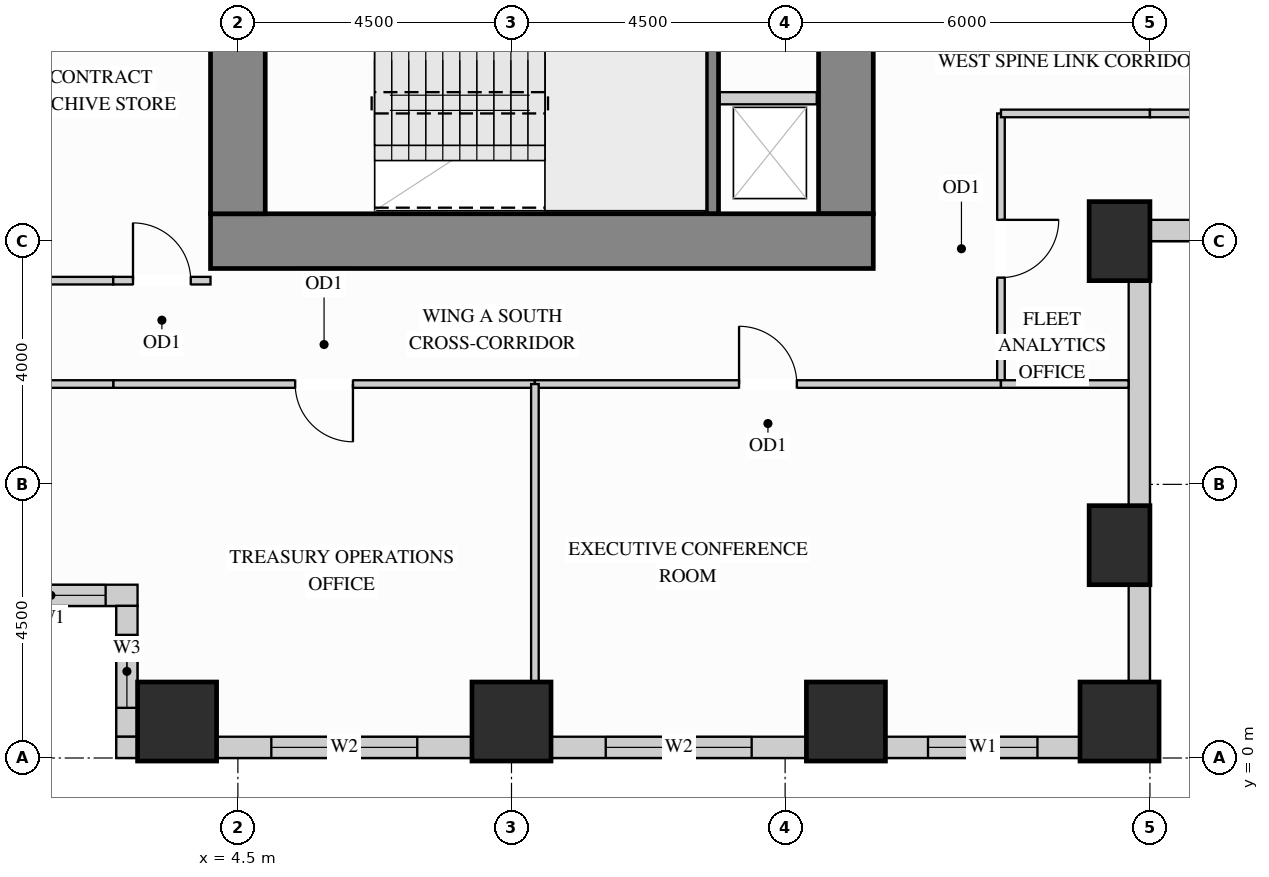
"""IFC4 building model, lengths in metres.
Left out: names, types, materials, properties, quantities, classifications, styles, units other than length and angle.
Written with IfcOpenShell. Run it as: python <this file> out.ifc"""

import sys

from ifc_helpers import new_model, si_unit, direction, frame, frame_2d, origin, origin_2d, place, context, subcontext, project, spatial, rectangle, extrude, source, transform, mapped, element, fill, save


model = new_model("IFC4")
c1 = context("Model", 3, precision=1e-05, world=origin(), true_north=direction((0.0, 1.0)))
c2 = subcontext(c1, "Body", "Model", "MODEL_VIEW")
j1 = project(units=[si_unit("LENGTHUNIT", "METRE"), si_unit("PLANEANGLEUNIT", "RADIAN")], contexts=[c1])
p1 = place(None, origin())
s1 = spatial("IfcSite", under=j1, at=p1, CompositionType="ELEMENT")
p2 = place(p1, origin())
s2 = spatial("IfcBuilding", under=s1, at=p2, CompositionType="ELEMENT")
p3 = place(p2, frame((0.0, 0.0, 40.5)))
s3 = spatial("IfcBuildingStorey", under=s2, at=p3, CompositionType="ELEMENT", Elevation=40.5)
m1 = source(origin(), c2, "Body", "SweptSolid", [
    extrude(rectangle(XDim=1.0, YDim=1.3, at=origin_2d()), origin(), (0.0, 0.0, 1.0), 3.38),
])
for number, where, z_axis, x_axis in (
    (1, (19.0, 3.5, 0.0), (0.0, 0.0, 1.0), (1.0, 0.0, 0.0)),
    (2, (19.0, 8.5, 0.0), (0.0, 0.0, 1.0), (1.0, 0.0, 0.0)),
):
    element("IfcColumn", number, at=place(p3, frame(where, z_axis=z_axis, x_axis=x_axis)), inside=s3, PredefinedType="COLUMN", context=c2, shape_type="MappedRepresentation", body=[
        mapped(m1, transform((0.0, 0.0, 0.0), x_axis=(1.0, 0.0, 0.0), y_axis=(0.0, 1.0, 0.0), z_axis=(0.0, 0.0, 1.0))),
    ])
m2 = source(origin(), c2, "Body", "SweptSolid", [
    extrude(rectangle(XDim=1.3, YDim=1.3, at=origin_2d()), origin(), (0.0, 0.0, 1.0), 3.38),
])
for number, where, z_axis, x_axis in (
    (3, (14.5, 0.6, 0.0), (0.0, 0.0, 1.0), (1.0, 0.0, 0.0)),
    (4, (19.0, 0.6, 0.0), (0.0, 0.0, 1.0), (1.0, 0.0, 0.0)),
    (5, (3.5, 0.6, 0.0), (0.0, 0.0, 1.0), (1.0, 0.0, 0.0)),
    (6, (9.0, 0.6, 0.0), (0.0, 0.0, 1.0), (1.0, 0.0, 0.0)),
):
    element("IfcColumn", number, at=place(p3, frame(where, z_axis=z_axis, x_axis=x_axis)), inside=s3, PredefinedType="COLUMN", context=c2, shape_type="MappedRepresentation", body=[
        mapped(m2, transform((0.0, 0.0, 0.0), x_axis=(1.0, 0.0, 0.0), y_axis=(0.0, 1.0, 0.0), z_axis=(0.0, 0.0, 1.0))),
    ])
m3 = source(origin(), c2, "Body", "SweptSolid", [
    extrude(rectangle(XDim=9.87, YDim=0.9, at=frame_2d((4.935, 0.0))), origin(), (0.0, 0.0, 1.0), 3.38),
])
p4 = place(p3, frame((14.5, 8.95, 0.0), z_axis=(0.0, 0.0, 1.0), x_axis=(0.0, 1.0, 0.0)))
e7 = element("IfcWall", 7, at=p4, inside=s3, PredefinedType="SHEAR", context=c2, shape_type="MappedRepresentation", body=[
    mapped(m3, transform((0.0, 0.0, 0.0), x_axis=(1.0, 0.0, 0.0), y_axis=(0.0, 1.0, 0.0), z_axis=(0.0, 0.0, 1.0))),
])
m4 = source(origin(), c2, "Body", "SweptSolid", [
    extrude(rectangle(XDim=10.9, YDim=0.9, at=frame_2d((5.45, 0.0))), origin(), (0.0, 0.0, 1.0), 3.38),
])
p5 = place(p3, frame((4.05, 8.5, 0.0), z_axis=(0.0, 0.0, 1.0), x_axis=(1.0, 0.0, 0.0)))
e8 = element("IfcWall", 8, at=p5, inside=s3, PredefinedType="SHEAR", context=c2, shape_type="MappedRepresentation", body=[
    mapped(m4, transform((0.0, 0.0, 0.0), x_axis=(1.0, 0.0, 0.0), y_axis=(0.0, 1.0, 0.0), z_axis=(0.0, 0.0, 1.0))),
])
m5 = source(origin(), c2, "Body", "SweptSolid", [
    extrude(rectangle(XDim=20.1, YDim=0.9, at=frame_2d((10.05, 0.0))), origin(), (0.0, 0.0, 1.0), 3.38),
])
p6 = place(p3, frame((4.5, 8.95, 0.0), z_axis=(0.0, 0.0, 1.0), x_axis=(0.0, 1.0, 0.0)))
e9 = element("IfcWall", 9, at=p6, inside=s3, PredefinedType="SHEAR", context=c2, shape_type="MappedRepresentation", body=[
    mapped(m5, transform((0.0, 0.0, 0.0), x_axis=(1.0, 0.0, 0.0), y_axis=(0.0, 1.0, 0.0), z_axis=(0.0, 0.0, 1.0))),
])
p7 = place(p3, frame((0.0, 2.675, 0.0), z_axis=(0.0, 0.0, 1.0), x_axis=(1.0, 0.0, 0.0)))
e10 = element("IfcWall", 10, at=p7, inside=s3, PredefinedType="SOLIDWALL", context=c2, shape_type="SweptSolid", body=[
    extrude(rectangle(XDim=2.85, YDim=0.35, at=frame_2d((1.425, 0.0))), origin(), (0.0, 0.0, 1.0), 3.365),
])
p8 = place(p7, frame((0.525, 0.0, 0.78)))
e11 = element("IfcOpeningElement", 11, at=p8, cuts=e10, PredefinedType="OPENING", context=c2, shape_type="SweptSolid", body=[
    extrude(rectangle(XDim=1.8, YDim=2.1, at=frame_2d((0.9, 1.05))), frame((0.0, 0.185, 0.0), z_axis=(0.0, -1.0, 0.0), x_axis=(1.0, 0.0, 0.0)), (0.0, 0.0, 1.0), 0.37),
])
p9 = place(p3, frame((2.675, 2.502, 0.0), z_axis=(0.0, 0.0, 1.0), x_axis=(0.0, -1.0, 0.0)))
e12 = element("IfcWall", 12, at=p9, inside=s3, PredefinedType="SOLIDWALL", context=c2, shape_type="SweptSolid", body=[
    extrude(rectangle(XDim=2.154, YDim=0.35, at=frame_2d((1.077, 0.0))), origin(), (0.0, 0.0, 1.0), 3.365),
])
p10 = place(p9, frame((0.477, 0.0, 0.78)))
e13 = element("IfcOpeningElement", 13, at=p10, cuts=e12, PredefinedType="OPENING", context=c2, shape_type="SweptSolid", body=[
    extrude(rectangle(XDim=1.2, YDim=2.1, at=frame_2d((0.6, 1.05))), frame((0.0, 0.185, 0.0), z_axis=(0.0, -1.0, 0.0), x_axis=(1.0, 0.0, 0.0)), (0.0, 0.0, 1.0), 0.37),
])
m6 = source(origin(), c2, "Body", "SweptSolid", [
    extrude(rectangle(XDim=0.352, YDim=0.35, at=frame_2d((0.176, 0.0))), origin(), (0.0, 0.0, 1.0), 3.365),
])
p11 = place(p3, frame((2.5, 0.175, 0.0), z_axis=(0.0, 0.0, 1.0), x_axis=(1.0, 0.0, 0.0)))
e14 = element("IfcWall", 14, at=p11, inside=s3, PredefinedType="SOLIDWALL", context=c2, shape_type="MappedRepresentation", body=[
    mapped(m6, transform((0.0, 0.0, 0.0), x_axis=(1.0, 0.0, 0.0), y_axis=(0.0, 1.0, 0.0), z_axis=(0.0, 0.0, 1.0))),
])
p12 = place(p3, frame((4.148, 0.175, 0.0), z_axis=(0.0, 0.0, 1.0), x_axis=(1.0, 0.0, 0.0)))
e15 = element("IfcWall", 15, at=p12, inside=s3, PredefinedType="SOLIDWALL", context=c2, shape_type="SweptSolid", body=[
    extrude(rectangle(XDim=4.204, YDim=0.35, at=frame_2d((2.102, 0.0))), origin(), (0.0, 0.0, 1.0), 2.51),
])
p13 = place(p12, frame((0.902, 0.0, 0.78)))
e16 = element("IfcOpeningElement", 16, at=p13, cuts=e15, PredefinedType="OPENING", context=c2, shape_type="SweptSolid", body=[
    extrude(rectangle(XDim=2.4, YDim=1.55, at=frame_2d((1.2, 0.775))), frame((0.0, 0.185, 0.0), z_axis=(0.0, -1.0, 0.0), x_axis=(1.0, 0.0, 0.0)), (0.0, 0.0, 1.0), 0.37),
])
p14 = place(p3, frame((9.648, 0.175, 0.0), z_axis=(0.0, 0.0, 1.0), x_axis=(1.0, 0.0, 0.0)))
e17 = element("IfcWall", 17, at=p14, inside=s3, PredefinedType="SOLIDWALL", context=c2, shape_type="SweptSolid", body=[
    extrude(rectangle(XDim=4.204, YDim=0.35, at=frame_2d((2.102, 0.0))), origin(), (0.0, 0.0, 1.0), 2.51),
])
p15 = place(p14, frame((0.902, 0.0, 0.78)))
e18 = element("IfcOpeningElement", 18, at=p15, cuts=e17, PredefinedType="OPENING", context=c2, shape_type="SweptSolid", body=[
    extrude(rectangle(XDim=2.4, YDim=1.55, at=frame_2d((1.2, 0.775))), frame((0.0, 0.185, 0.0), z_axis=(0.0, -1.0, 0.0), x_axis=(1.0, 0.0, 0.0)), (0.0, 0.0, 1.0), 0.37),
])
p16 = place(p3, frame((15.148, 0.175, 0.0), z_axis=(0.0, 0.0, 1.0), x_axis=(1.0, 0.0, 0.0)))
e19 = element("IfcWall", 19, at=p16, inside=s3, PredefinedType="SOLIDWALL", context=c2, shape_type="SweptSolid", body=[
    extrude(rectangle(XDim=3.204, YDim=0.35, at=frame_2d((1.602, 0.0))), origin(), (0.0, 0.0, 1.0), 2.51),
])
p17 = place(p16, frame((0.702, 0.0, 0.78)))
e20 = element("IfcOpeningElement", 20, at=p17, cuts=e19, PredefinedType="OPENING", context=c2, shape_type="SweptSolid", body=[
    extrude(rectangle(XDim=1.8, YDim=1.55, at=frame_2d((0.9, 0.775))), frame((0.0, 0.185, 0.0), z_axis=(0.0, -1.0, 0.0), x_axis=(1.0, 0.0, 0.0)), (0.0, 0.0, 1.0), 0.37),
])
m7 = source(origin(), c2, "Body", "SweptSolid", [
    extrude(rectangle(XDim=1.604, YDim=0.35, at=frame_2d((0.802, 0.0))), origin(), (0.0, 0.0, 1.0), 2.51),
])
p18 = place(p3, frame((19.325, 1.248, 0.0), z_axis=(0.0, 0.0, 1.0), x_axis=(0.0, 1.0, 0.0)))
e21 = element("IfcWall", 21, at=p18, inside=s3, PredefinedType="SOLIDWALL", context=c2, shape_type="MappedRepresentation", body=[
    mapped(m7, transform((0.0, 0.0, 0.0), x_axis=(1.0, 0.0, 0.0), y_axis=(0.0, 1.0, 0.0), z_axis=(0.0, 0.0, 1.0))),
])
m8 = source(origin(), c2, "Body", "SweptSolid", [
    extrude(rectangle(XDim=3.704, YDim=0.35, at=frame_2d((1.852, 0.0))), origin(), (0.0, 0.0, 1.0), 2.51),
])
p19 = place(p3, frame((19.325, 4.148, 0.0), z_axis=(0.0, 0.0, 1.0), x_axis=(0.0, 1.0, 0.0)))
e22 = element("IfcWall", 22, at=p19, inside=s3, PredefinedType="SOLIDWALL", context=c2, shape_type="MappedRepresentation", body=[
    mapped(m8, transform((0.0, 0.0, 0.0), x_axis=(1.0, 0.0, 0.0), y_axis=(0.0, 1.0, 0.0), z_axis=(0.0, 0.0, 1.0))),
])
p20 = place(p3, frame((19.498, 8.675, 0.0), z_axis=(0.0, 0.0, 1.0), x_axis=(1.0, 0.0, 0.0)))
e23 = element("IfcWall", 23, at=p20, inside=s3, PredefinedType="SOLIDWALL", context=c2, shape_type="SweptSolid", body=[
    extrude(rectangle(XDim=3.404, YDim=0.35, at=frame_2d((1.702, 0.0))), origin(), (0.0, 0.0, 1.0), 3.365),
])
p21 = place(p20, frame((0.952, 0.0, 0.78)))
e24 = element("IfcOpeningElement", 24, at=p21, cuts=e23, PredefinedType="OPENING", context=c2, shape_type="SweptSolid", body=[
    extrude(rectangle(XDim=1.5, YDim=2.0, at=frame_2d((0.75, 1.0))), frame((0.0, 0.185, 0.0), z_axis=(0.0, -1.0, 0.0), x_axis=(1.0, 0.0, 0.0)), (0.0, 0.0, 1.0), 0.37),
])
p22 = place(p3, frame((17.05, 6.15, 0.0), z_axis=(0.0, 0.0, 1.0), x_axis=(0.0, 1.0, 0.0)))
e25 = element("IfcWall", 25, at=p22, inside=s3, PredefinedType="PARTITIONING", context=c2, shape_type="SweptSolid", body=[
    extrude(rectangle(XDim=4.45, YDim=0.125, at=frame_2d((2.225, 0.0))), origin(), (0.0, 0.0, 1.0), 3.365),
])
p23 = place(p22, frame((1.75, 0.0, 0.0)))
e26 = element("IfcOpeningElement", 26, at=p23, cuts=e25, PredefinedType="OPENING", context=c2, shape_type="SweptSolid", body=[
    extrude(rectangle(XDim=0.95, YDim=2.15, at=frame_2d((0.475, 1.075))), frame((0.0, 0.073, 0.0), z_axis=(0.0, -1.0, 0.0), x_axis=(1.0, 0.0, 0.0)), (0.0, 0.0, 1.0), 0.145),
])
m9 = source(origin(), c2, "Body", "SweptSolid", [
    extrude(rectangle(XDim=1.19, YDim=0.125, at=frame_2d((0.595, 0.0))), origin(), (0.0, 0.0, 1.0), 3.365),
])
p24 = place(p3, frame((1.26, 7.85, 0.0), z_axis=(0.0, 0.0, 1.0), x_axis=(1.0, 0.0, 0.0)))
e27 = element("IfcWall", 27, at=p24, inside=s3, PredefinedType="PARTITIONING", context=c2, shape_type="MappedRepresentation", body=[
    mapped(m9, transform((0.0, 0.0, 0.0), x_axis=(1.0, 0.0, 0.0), y_axis=(0.0, 1.0, 0.0), z_axis=(0.0, 0.0, 1.0))),
])
p25 = place(p3, frame((2.45, 7.85, 0.0), z_axis=(0.0, 0.0, 1.0), x_axis=(1.0, 0.0, 0.0)))
e28 = element("IfcWall", 28, at=p25, inside=s3, PredefinedType="PARTITIONING", context=c2, shape_type="SweptSolid", body=[
    extrude(rectangle(XDim=1.6, YDim=0.125, at=frame_2d((0.8, 0.0))), origin(), (0.0, 0.0, 1.0), 3.365),
])
p26 = place(p25, frame((0.325, 0.0, 0.0)))
e29 = element("IfcOpeningElement", 29, at=p26, cuts=e28, PredefinedType="OPENING", context=c2, shape_type="SweptSolid", body=[
    extrude(rectangle(XDim=0.95, YDim=2.15, at=frame_2d((0.475, 1.075))), frame((0.0, 0.073, 0.0), z_axis=(0.0, -1.0, 0.0), x_axis=(1.0, 0.0, 0.0)), (0.0, 0.0, 1.0), 0.145),
])
m10 = source(origin(), c2, "Body", "SweptSolid", [
    extrude(rectangle(XDim=2.45, YDim=0.125, at=frame_2d((1.225, 0.0))), origin(), (0.0, 0.0, 1.0), 3.365),
])
p27 = place(p3, frame((17.05, 10.6, 0.0), z_axis=(0.0, 0.0, 1.0), x_axis=(1.0, 0.0, 0.0)))
e30 = element("IfcWall", 30, at=p27, inside=s3, PredefinedType="PARTITIONING", context=c2, shape_type="MappedRepresentation", body=[
    mapped(m10, transform((0.0, 0.0, 0.0), x_axis=(1.0, 0.0, 0.0), y_axis=(0.0, 1.0, 0.0), z_axis=(0.0, 0.0, 1.0))),
])
p28 = place(p3, frame((19.5, 10.6, 0.0), z_axis=(0.0, 0.0, 1.0), x_axis=(1.0, 0.0, 0.0)))
e31 = element("IfcWall", 31, at=p28, inside=s3, PredefinedType="PARTITIONING", context=c2, shape_type="SweptSolid", body=[
    extrude(rectangle(XDim=7.45, YDim=0.125, at=frame_2d((3.725, 0.0))), origin(), (0.0, 0.0, 1.0), 3.365),
])
p29 = place(p28, frame((1.817, 0.0, 0.0)))
e32 = element("IfcOpeningElement", 32, at=p29, cuts=e31, PredefinedType="OPENING", context=c2, shape_type="SweptSolid", body=[
    extrude(rectangle(XDim=0.95, YDim=2.15, at=frame_2d((0.475, 1.075))), frame((0.0, 0.073, 0.0), z_axis=(0.0, -1.0, 0.0), x_axis=(1.0, 0.0, 0.0)), (0.0, 0.0, 1.0), 0.145),
])
p30 = place(p3, frame((2.45, 6.15, 0.0), z_axis=(0.0, 0.0, 1.0), x_axis=(1.0, 0.0, 0.0)))
e33 = element("IfcWall", 33, at=p30, inside=s3, PredefinedType="PARTITIONING", context=c2, shape_type="SweptSolid", body=[
    extrude(rectangle(XDim=6.935, YDim=0.125, at=frame_2d((3.468, 0.0))), origin(), (0.0, 0.0, 1.0), 3.365),
])
p31 = place(p30, frame((2.992, 0.0, 0.0)))
e34 = element("IfcOpeningElement", 34, at=p31, cuts=e33, PredefinedType="OPENING", context=c2, shape_type="SweptSolid", body=[
    extrude(rectangle(XDim=0.95, YDim=2.15, at=frame_2d((0.475, 1.075))), frame((0.0, 0.073, 0.0), z_axis=(0.0, -1.0, 0.0), x_axis=(1.0, 0.0, 0.0)), (0.0, 0.0, 1.0), 0.145),
])
p32 = place(p3, frame((9.385, 6.15, 0.0), z_axis=(0.0, 0.0, 1.0), x_axis=(1.0, 0.0, 0.0)))
e35 = element("IfcWall", 35, at=p32, inside=s3, PredefinedType="PARTITIONING", context=c2, shape_type="SweptSolid", body=[
    extrude(rectangle(XDim=7.665, YDim=0.125, at=frame_2d((3.833, 0.0))), origin(), (0.0, 0.0, 1.0), 3.365),
])
p33 = place(p32, frame((3.357, 0.0, 0.0)))
e36 = element("IfcOpeningElement", 36, at=p33, cuts=e35, PredefinedType="OPENING", context=c2, shape_type="SweptSolid", body=[
    extrude(rectangle(XDim=0.95, YDim=2.15, at=frame_2d((0.475, 1.075))), frame((0.0, 0.073, 0.0), z_axis=(0.0, -1.0, 0.0), x_axis=(1.0, 0.0, 0.0)), (0.0, 0.0, 1.0), 0.145),
])
m11 = source(origin(), c2, "Body", "SweptSolid", [
    extrude(rectangle(XDim=2.098, YDim=0.125, at=frame_2d((1.049, 0.0))), origin(), (0.0, 0.0, 1.0), 3.365),
])
for number, where, z_axis, x_axis in (
    (37, (0.352, 6.15, 0.0), (0.0, 0.0, 1.0), (1.0, 0.0, 0.0)),
    (38, (17.05, 6.15, 0.0), (0.0, 0.0, 1.0), (1.0, 0.0, 0.0)),
):
    element("IfcWall", number, at=place(p3, frame(where, z_axis=z_axis, x_axis=x_axis)), inside=s3, PredefinedType="PARTITIONING", context=c2, shape_type="MappedRepresentation", body=[
        mapped(m11, transform((0.0, 0.0, 0.0), x_axis=(1.0, 0.0, 0.0), y_axis=(0.0, 1.0, 0.0), z_axis=(0.0, 0.0, 1.0))),
    ])
m12 = source(origin(), c2, "Body", "SweptSolid", [
    extrude(rectangle(XDim=4.89, YDim=0.125, at=frame_2d((2.445, 0.0))), origin(), (0.0, 0.0, 1.0), 3.365),
])
p34 = place(p3, frame((9.385, 1.26, 0.0), z_axis=(0.0, 0.0, 1.0), x_axis=(0.0, 1.0, 0.0)))
e39 = element("IfcWall", 39, at=p34, inside=s3, PredefinedType="PARTITIONING", context=c2, shape_type="MappedRepresentation", body=[
    mapped(m12, transform((0.0, 0.0, 0.0), x_axis=(1.0, 0.0, 0.0), y_axis=(0.0, 1.0, 0.0), z_axis=(0.0, 0.0, 1.0))),
])
m13 = source(origin(), c2, "Body", "SweptSolid", [
    extrude(rectangle(XDim=1.6, YDim=0.2, at=frame_2d((0.8, 0.0))), origin(), (0.0, 0.0, 1.0), 3.365),
])
p35 = place(p3, frame((12.42, 10.85, 0.0), z_axis=(0.0, 0.0, 1.0), x_axis=(1.0, 0.0, 0.0)))
e40 = element("IfcWall", 40, at=p35, inside=s3, PredefinedType="PARTITIONING", context=c2, shape_type="MappedRepresentation", body=[
    mapped(m13, transform((0.0, 0.0, 0.0), x_axis=(1.0, 0.0, 0.0), y_axis=(0.0, 1.0, 0.0), z_axis=(0.0, 0.0, 1.0))),
])
m14 = source(origin(), c2, "Body", "SweptSolid", [
    extrude(rectangle(XDim=3.603, YDim=0.2, at=frame_2d((1.802, 0.0))), origin(), (0.0, 0.0, 1.0), 3.38),
])
p36 = place(p3, frame((12.305, 8.952, 0.0), z_axis=(0.0, 0.0, 1.0), x_axis=(0.0, 1.0, 0.0)))
e41 = element("IfcWall", 41, at=p36, inside=s3, PredefinedType="SHEAR", context=c2, shape_type="MappedRepresentation", body=[
    mapped(m14, transform((0.0, 0.0, 0.0), x_axis=(1.0, 0.0, 0.0), y_axis=(0.0, 1.0, 0.0), z_axis=(0.0, 0.0, 1.0))),
])
m15 = source(origin(), c2, "Body", "SweptSolid", [
    extrude(rectangle(XDim=0.95, YDim=2.15, at=frame_2d((0.475, 1.075))), frame((0.0, 0.025, 0.0), z_axis=(0.0, -1.0, 0.0), x_axis=(1.0, 0.0, 0.0)), (0.0, 0.0, 1.0), 0.05),
])
p37 = place(p23, origin())
e42 = element("IfcDoor", 42, at=p37, inside=s3, OperationType="SINGLE_SWING_RIGHT", PredefinedType="DOOR", context=c2, shape_type="MappedRepresentation", body=[
    mapped(m15, transform((0.0, 0.0, 0.0), x_axis=(1.0, 0.0, 0.0), y_axis=(0.0, 1.0, 0.0), z_axis=(0.0, 0.0, 1.0))),
])
fill(e26, e42)
p38 = place(p31, origin())
e43 = element("IfcDoor", 43, at=p38, inside=s3, OperationType="SINGLE_SWING_RIGHT", PredefinedType="DOOR", context=c2, shape_type="MappedRepresentation", body=[
    mapped(m15, transform((0.0, 0.0, 0.0), x_axis=(1.0, 0.0, 0.0), y_axis=(0.0, 1.0, 0.0), z_axis=(0.0, 0.0, 1.0))),
])
fill(e34, e43)
p39 = place(p33, origin())
e44 = element("IfcDoor", 44, at=p39, inside=s3, OperationType="SINGLE_SWING_LEFT", PredefinedType="DOOR", context=c2, shape_type="MappedRepresentation", body=[
    mapped(m15, transform((0.0, 0.0, 0.0), x_axis=(1.0, 0.0, 0.0), y_axis=(0.0, 1.0, 0.0), z_axis=(0.0, 0.0, 1.0))),
])
fill(e36, e44)
p40 = place(p26, origin())
e45 = element("IfcDoor", 45, at=p40, inside=s3, OperationType="SINGLE_SWING_LEFT", PredefinedType="DOOR", context=c2, shape_type="MappedRepresentation", body=[
    mapped(m15, transform((0.0, 0.0, 0.0), x_axis=(1.0, 0.0, 0.0), y_axis=(0.0, 1.0, 0.0), z_axis=(0.0, 0.0, 1.0))),
])
fill(e29, e45)
m16 = source(origin(), c2, "Body", "SweptSolid", [
    extrude(rectangle(XDim=1.8, YDim=2.1, at=frame_2d((0.9, 1.05))), frame((0.0, 0.03, 0.0), z_axis=(0.0, -1.0, 0.0), x_axis=(1.0, 0.0, 0.0)), (0.0, 0.0, 1.0), 0.06),
])
p41 = place(p8, origin())
e46 = element("IfcWindow", 46, at=p41, inside=s3, PartitioningType="SINGLE_PANEL", PredefinedType="WINDOW", context=c2, shape_type="MappedRepresentation", body=[
    mapped(m16, transform((0.0, 0.0, 0.0), x_axis=(1.0, 0.0, 0.0), y_axis=(0.0, 1.0, 0.0), z_axis=(0.0, 0.0, 1.0))),
])
fill(e11, e46)
m17 = source(origin(), c2, "Body", "SweptSolid", [
    extrude(rectangle(XDim=1.8, YDim=1.55, at=frame_2d((0.9, 0.775))), frame((0.0, 0.03, 0.0), z_axis=(0.0, -1.0, 0.0), x_axis=(1.0, 0.0, 0.0)), (0.0, 0.0, 1.0), 0.06),
])
p42 = place(p17, origin())
e47 = element("IfcWindow", 47, at=p42, inside=s3, PartitioningType="SINGLE_PANEL", PredefinedType="WINDOW", context=c2, shape_type="MappedRepresentation", body=[
    mapped(m17, transform((0.0, 0.0, 0.0), x_axis=(1.0, 0.0, 0.0), y_axis=(0.0, 1.0, 0.0), z_axis=(0.0, 0.0, 1.0))),
])
fill(e20, e47)
m18 = source(origin(), c2, "Body", "SweptSolid", [
    extrude(rectangle(XDim=2.4, YDim=1.55, at=frame_2d((1.2, 0.775))), frame((0.0, 0.03, 0.0), z_axis=(0.0, -1.0, 0.0), x_axis=(1.0, 0.0, 0.0)), (0.0, 0.0, 1.0), 0.06),
])
p43 = place(p13, origin())
e48 = element("IfcWindow", 48, at=p43, inside=s3, PartitioningType="SINGLE_PANEL", PredefinedType="WINDOW", context=c2, shape_type="MappedRepresentation", body=[
    mapped(m18, transform((0.0, 0.0, 0.0), x_axis=(1.0, 0.0, 0.0), y_axis=(0.0, 1.0, 0.0), z_axis=(0.0, 0.0, 1.0))),
])
fill(e16, e48)
p44 = place(p15, origin())
e49 = element("IfcWindow", 49, at=p44, inside=s3, PartitioningType="SINGLE_PANEL", PredefinedType="WINDOW", context=c2, shape_type="MappedRepresentation", body=[
    mapped(m18, transform((0.0, 0.0, 0.0), x_axis=(1.0, 0.0, 0.0), y_axis=(0.0, 1.0, 0.0), z_axis=(0.0, 0.0, 1.0))),
])
fill(e18, e49)
m19 = source(origin(), c2, "Body", "SweptSolid", [
    extrude(rectangle(XDim=1.2, YDim=2.1, at=frame_2d((0.6, 1.05))), frame((0.0, 0.03, 0.0), z_axis=(0.0, -1.0, 0.0), x_axis=(1.0, 0.0, 0.0)), (0.0, 0.0, 1.0), 0.06),
])
p45 = place(p10, origin())
e50 = element("IfcWindow", 50, at=p45, inside=s3, PartitioningType="SINGLE_PANEL", PredefinedType="WINDOW", context=c2, shape_type="MappedRepresentation", body=[
    mapped(m19, transform((0.0, 0.0, 0.0), x_axis=(1.0, 0.0, 0.0), y_axis=(0.0, 1.0, 0.0), z_axis=(0.0, 0.0, 1.0))),
])
fill(e13, e50)
save(model, sys.argv[1])
